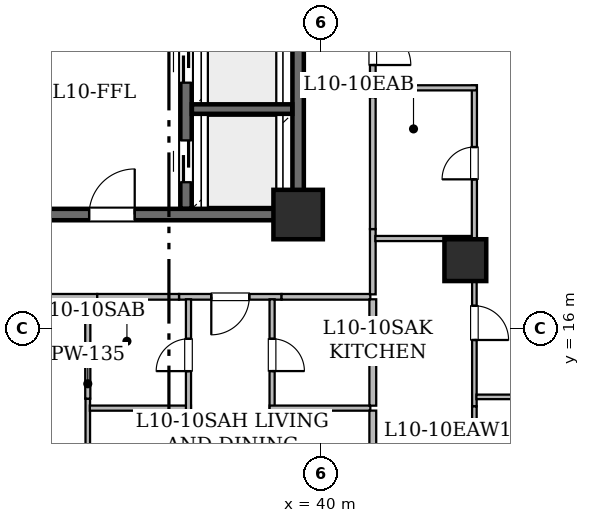
"""IFC4 building model, lengths in metres.
Left out: names, types, materials, properties, quantities, classifications, styles, units other than length and angle.
Written with IfcOpenShell. Run it as: python <this file> out.ifc"""

import sys

from ifc_helpers import new_model, si_unit, direction, frame, frame_2d, origin, origin_2d, place, context, subcontext, project, spatial, rectangle, hollow_rectangle, extrude, element, fill, save


model = new_model("IFC4")
c1 = context("Model", 3, precision=1e-05, world=origin(), true_north=direction((0.0, 1.0)))
c2 = subcontext(c1, "Body", "Model", "MODEL_VIEW")
j1 = project(units=[si_unit("LENGTHUNIT", "METRE"), si_unit("PLANEANGLEUNIT", "RADIAN")], contexts=[c1])
p1 = place(None, origin())
s1 = spatial("IfcSite", under=j1, at=p1, CompositionType="ELEMENT")
p2 = place(p1, origin())
s2 = spatial("IfcBuilding", under=s1, at=p2, CompositionType="ELEMENT")
p3 = place(p2, frame((0.0, 0.0, 44.25)))
s3 = spatial("IfcBuildingStorey", under=s2, at=p3, CompositionType="ELEMENT", Elevation=44.25)
p4 = place(p3, frame((39.4, 19.0, 0.0), z_axis=(0.0, 0.0, 1.0), x_axis=(1.0, 0.0, 0.0)))
e1 = element("IfcColumn", 1, at=p4, inside=s3, PredefinedType="COLUMN", context=c2, shape_type="SweptSolid", body=[
    extrude(hollow_rectangle(XDim=1.3, YDim=1.3, WallThickness=0.065, at=origin_2d()), origin(), (0.0, 0.0, 1.0), 3.65),
])
p5 = place(p3, frame((43.8, 17.8, 0.0), z_axis=(0.0, 0.0, 1.0), x_axis=(1.0, 0.0, 0.0)))
e2 = element("IfcColumn", 2, at=p5, inside=s3, PredefinedType="COLUMN", context=c2, shape_type="SweptSolid", body=[
    extrude(hollow_rectangle(XDim=1.1, YDim=1.1, WallThickness=0.055, at=origin_2d()), origin(), (0.0, 0.0, 1.0), 3.65),
])
p6 = place(p3, frame((29.0, 19.0, 0.0), z_axis=(0.0, 0.0, 1.0), x_axis=(1.0, 0.0, 0.0)))
e3 = element("IfcWall", 3, at=p6, inside=s3, PredefinedType="SHEAR", context=c2, shape_type="SweptSolid", body=[
    extrude(rectangle(XDim=10.4, YDim=0.3, at=frame_2d((5.2, 0.0))), origin(), (0.0, 0.0, 1.0), 3.43),
])
p7 = place(p6, frame((4.9, 0.0, 0.0)))
e4 = element("IfcOpeningElement", 4, at=p7, cuts=e3, PredefinedType="OPENING", context=c2, shape_type="SweptSolid", body=[
    extrude(rectangle(XDim=1.2, YDim=2.15, at=frame_2d((0.6, 1.075))), frame((0.0, 0.16, 0.0), z_axis=(0.0, -1.0, 0.0), x_axis=(1.0, 0.0, 0.0)), (0.0, 0.0, 1.0), 0.32),
])
p8 = place(p3, frame((39.4, 19.0, 0.0), z_axis=(0.0, 0.0, 1.0), x_axis=(0.0, 1.0, 0.0)))
e5 = element("IfcWall", 5, at=p8, inside=s3, PredefinedType="SHEAR", context=c2, shape_type="SweptSolid", body=[
    extrude(rectangle(XDim=5.4, YDim=0.3, at=frame_2d((2.7, 0.0))), origin(), (0.0, 0.0, 1.0), 3.43),
])
p9 = place(p3, frame((36.45, 19.154, 0.0), z_axis=(0.0, 0.0, 1.0), x_axis=(0.0, 1.0, 0.0)))
e6 = element("IfcWall", 6, at=p9, inside=s3, PredefinedType="SHEAR", context=c2, shape_type="SweptSolid", body=[
    extrude(rectangle(XDim=4.596, YDim=0.3, at=frame_2d((2.298, 0.0))), origin(), (0.0, 0.0, 1.0), 3.43),
])
p10 = place(p9, frame((0.696, 0.0, 0.0)))
e7 = element("IfcOpeningElement", 7, at=p10, cuts=e6, PredefinedType="OPENING", context=c2, shape_type="SweptSolid", body=[
    extrude(rectangle(XDim=1.1, YDim=2.15, at=frame_2d((0.55, 1.075))), frame((0.0, 0.16, 0.0), z_axis=(0.0, -1.0, 0.0), x_axis=(1.0, 0.0, 0.0)), (0.0, 0.0, 1.0), 0.32),
])
p11 = place(p9, frame((3.316, 0.0, 0.0)))
e8 = element("IfcOpeningElement", 8, at=p11, cuts=e6, PredefinedType="OPENING", context=c2, shape_type="SweptSolid", body=[
    extrude(rectangle(XDim=1.1, YDim=2.15, at=frame_2d((0.55, 1.075))), frame((0.0, 0.16, 0.0), z_axis=(0.0, -1.0, 0.0), x_axis=(1.0, 0.0, 0.0)), (0.0, 0.0, 1.0), 0.32),
])
p12 = place(p3, frame((36.604, 21.775, 0.0), z_axis=(0.0, 0.0, 1.0), x_axis=(1.0, 0.0, 0.0)))
e9 = element("IfcWall", 9, at=p12, inside=s3, PredefinedType="SHEAR", context=c2, shape_type="SweptSolid", body=[
    extrude(rectangle(XDim=2.642, YDim=0.25, at=frame_2d((1.321, 0.0))), origin(), (0.0, 0.0, 1.0), 3.43),
])
p13 = place(p3, frame((34.114, 16.835, 0.0), z_axis=(0.0, 0.0, 1.0), x_axis=(-1.0, 0.0, 0.0)))
e10 = element("IfcWall", 10, at=p13, inside=s3, PredefinedType="STANDARD", context=c2, shape_type="SweptSolid", body=[
    extrude(rectangle(XDim=7.214, YDim=0.15, at=frame_2d((3.607, 0.0))), origin(), (0.0, 0.0, 1.0), 2.647),
])
p14 = place(p13, frame((3.053, 0.0, 0.0)))
e11 = element("IfcOpeningElement", 11, at=p14, cuts=e10, PredefinedType="OPENING", context=c2, shape_type="SweptSolid", body=[
    extrude(rectangle(XDim=1.15, YDim=2.2, at=frame_2d((0.575, 1.1))), frame((0.0, 0.085, 0.0), z_axis=(0.0, -1.0, 0.0), x_axis=(1.0, 0.0, 0.0)), (0.0, 0.0, 1.0), 0.17),
])
p15 = place(p3, frame((38.964, 16.835, 0.0), z_axis=(0.0, 0.0, 1.0), x_axis=(-1.0, 0.0, 0.0)))
e12 = element("IfcWall", 12, at=p15, inside=s3, PredefinedType="STANDARD", context=c2, shape_type="SweptSolid", body=[
    extrude(rectangle(XDim=2.698, YDim=0.15, at=frame_2d((1.349, 0.0))), origin(), (0.0, 0.0, 1.0), 3.43),
])
p16 = place(p15, frame((0.849, 0.0, 0.0)))
e13 = element("IfcOpeningElement", 13, at=p16, cuts=e12, PredefinedType="OPENING", context=c2, shape_type="SweptSolid", body=[
    extrude(rectangle(XDim=1.0, YDim=2.15, at=frame_2d((0.5, 1.075))), frame((0.0, 0.085, 0.0), z_axis=(0.0, -1.0, 0.0), x_axis=(1.0, 0.0, 0.0)), (0.0, 0.0, 1.0), 0.17),
])
p17 = place(p3, frame((36.266, 16.835, 0.0), z_axis=(0.0, 0.0, 1.0), x_axis=(-1.0, 0.0, 0.0)))
e14 = element("IfcWall", 14, at=p17, inside=s3, PredefinedType="STANDARD", context=c2, shape_type="SweptSolid", body=[
    extrude(rectangle(XDim=2.152, YDim=0.15, at=frame_2d((1.076, 0.0))), origin(), (0.0, 0.0, 1.0), 3.43),
])
p18 = place(p3, frame((41.3, 16.835, 0.0), z_axis=(0.0, 0.0, 1.0), x_axis=(-1.0, 0.0, 0.0)))
e15 = element("IfcWall", 15, at=p18, inside=s3, PredefinedType="STANDARD", context=c2, shape_type="SweptSolid", body=[
    extrude(rectangle(XDim=2.336, YDim=0.15, at=frame_2d((1.168, 0.0))), origin(), (0.0, 0.0, 1.0), 3.43),
])
p19 = place(p3, frame((41.365, 18.618, 0.0), z_axis=(0.0, 0.0, 1.0), x_axis=(0.0, -1.0, 0.0)))
e16 = element("IfcWall", 16, at=p19, inside=s3, PredefinedType="STANDARD", context=c2, shape_type="SweptSolid", body=[
    extrude(rectangle(XDim=1.718, YDim=0.15, at=frame_2d((0.859, 0.0))), origin(), (0.0, 0.0, 1.0), 2.647),
])
p20 = place(p3, frame((41.365, 24.783, 0.0), z_axis=(0.0, 0.0, 1.0), x_axis=(0.0, -1.0, 0.0)))
e17 = element("IfcWall", 17, at=p20, inside=s3, PredefinedType="STANDARD", context=c2, shape_type="SweptSolid", body=[
    extrude(rectangle(XDim=2.698, YDim=0.15, at=frame_2d((1.349, 0.0))), origin(), (0.0, 0.0, 1.0), 2.957),
])
p21 = place(p20, frame((0.849, 0.0, 0.0)))
e18 = element("IfcOpeningElement", 18, at=p21, cuts=e17, PredefinedType="OPENING", context=c2, shape_type="SweptSolid", body=[
    extrude(rectangle(XDim=1.0, YDim=2.15, at=frame_2d((0.5, 1.075))), frame((0.0, 0.085, 0.0), z_axis=(0.0, -1.0, 0.0), x_axis=(1.0, 0.0, 0.0)), (0.0, 0.0, 1.0), 0.17),
])
p22 = place(p3, frame((41.365, 22.085, 0.0), z_axis=(0.0, 0.0, 1.0), x_axis=(0.0, -1.0, 0.0)))
e19 = element("IfcWall", 19, at=p22, inside=s3, PredefinedType="STANDARD", context=c2, shape_type="SweptSolid", body=[
    extrude(rectangle(XDim=3.467, YDim=0.15, at=frame_2d((1.733, 0.0))), origin(), (0.0, 0.0, 1.0), 2.647),
])
p23 = place(p3, frame((33.865, 14.155, 0.0), z_axis=(0.0, 0.0, 1.0), x_axis=(0.0, -1.0, 0.0)))
e20 = element("IfcWall", 20, at=p23, inside=s3, PredefinedType="PARTITIONING", context=c2, shape_type="SweptSolid", body=[
    extrude(rectangle(XDim=10.943, YDim=0.12, at=frame_2d((5.472, 0.0))), origin(), (0.0, 0.0, 1.0), 2.803),
])
p24 = place(p3, frame((33.865, 16.77, 0.0), z_axis=(0.0, 0.0, 1.0), x_axis=(0.0, -1.0, 0.0)))
e21 = element("IfcWall", 21, at=p24, inside=s3, PredefinedType="PARTITIONING", context=c2, shape_type="SweptSolid", body=[
    extrude(rectangle(XDim=2.615, YDim=0.135, at=frame_2d((1.308, 0.0))), origin(), (0.0, 0.0, 1.0), 3.43),
])
p25 = place(p3, frame((33.919, 13.906, 0.0), z_axis=(0.0, 0.0, 1.0), x_axis=(1.0, 0.0, 0.0)))
e22 = element("IfcWall", 22, at=p25, inside=s3, PredefinedType="PARTITIONING", context=c2, shape_type="SweptSolid", body=[
    extrude(rectangle(XDim=2.661, YDim=0.135, at=frame_2d((1.331, 0.0))), origin(), (0.0, 0.0, 1.0), 3.43),
])
p26 = place(p3, frame((36.515, 13.841, 0.0), z_axis=(0.0, 0.0, 1.0), x_axis=(0.0, 1.0, 0.0)))
e23 = element("IfcWall", 23, at=p26, inside=s3, PredefinedType="PARTITIONING", context=c2, shape_type="SweptSolid", body=[
    extrude(rectangle(XDim=2.929, YDim=0.135, at=frame_2d((1.464, 0.0))), origin(), (0.0, 0.0, 1.0), 3.43),
])
p27 = place(p26, frame((1.039, 0.0, 0.0)))
e24 = element("IfcOpeningElement", 24, at=p27, cuts=e23, PredefinedType="OPENING", context=c2, shape_type="SweptSolid", body=[
    extrude(rectangle(XDim=0.85, YDim=2.1, at=frame_2d((0.425, 1.05))), frame((0.0, 0.077, 0.0), z_axis=(0.0, -1.0, 0.0), x_axis=(1.0, 0.0, 0.0)), (0.0, 0.0, 1.0), 0.155),
])
p28 = place(p3, frame((38.715, 16.77, 0.0), z_axis=(0.0, 0.0, 1.0), x_axis=(0.0, -1.0, 0.0)))
e25 = element("IfcWall", 25, at=p28, inside=s3, PredefinedType="PARTITIONING", context=c2, shape_type="SweptSolid", body=[
    extrude(rectangle(XDim=2.929, YDim=0.135, at=frame_2d((1.464, 0.0))), origin(), (0.0, 0.0, 1.0), 3.43),
])
p29 = place(p28, frame((1.039, 0.0, 0.0)))
e26 = element("IfcOpeningElement", 26, at=p29, cuts=e25, PredefinedType="OPENING", context=c2, shape_type="SweptSolid", body=[
    extrude(rectangle(XDim=0.85, YDim=2.1, at=frame_2d((0.425, 1.05))), frame((0.0, 0.077, 0.0), z_axis=(0.0, -1.0, 0.0), x_axis=(1.0, 0.0, 0.0)), (0.0, 0.0, 1.0), 0.155),
])
p30 = place(p3, frame((38.65, 13.906, 0.0), z_axis=(0.0, 0.0, 1.0), x_axis=(1.0, 0.0, 0.0)))
e27 = element("IfcWall", 27, at=p30, inside=s3, PredefinedType="PARTITIONING", context=c2, shape_type="SweptSolid", body=[
    extrude(rectangle(XDim=2.65, YDim=0.135, at=frame_2d((1.325, 0.0))), origin(), (0.0, 0.0, 1.0), 3.43),
])
p31 = place(p3, frame((41.365, 13.841, 0.0), z_axis=(0.0, 0.0, 1.0), x_axis=(0.0, -1.0, 0.0)))
e28 = element("IfcWall", 28, at=p31, inside=s3, PredefinedType="STANDARD", context=c2, shape_type="SweptSolid", body=[
    extrude(rectangle(XDim=1.45, YDim=0.18, at=frame_2d((0.725, 0.0))), origin(), (0.0, 0.0, 1.0), 3.43),
])
p32 = place(p3, frame((41.365, 16.77, 0.0), z_axis=(0.0, 0.0, 1.0), x_axis=(0.0, -1.0, 0.0)))
e29 = element("IfcWall", 29, at=p32, inside=s3, PredefinedType="STANDARD", context=c2, shape_type="SweptSolid", body=[
    extrude(rectangle(XDim=2.799, YDim=0.18, at=frame_2d((1.399, 0.0))), origin(), (0.0, 0.0, 1.0), 3.43),
])
p33 = place(p3, frame((44.038, 18.304, 0.0), z_axis=(0.0, 0.0, 1.0), x_axis=(0.0, -1.0, 0.0)))
e30 = element("IfcWall", 30, at=p33, inside=s3, PredefinedType="PARTITIONING", context=c2, shape_type="SweptSolid", body=[
    extrude(rectangle(XDim=4.351, YDim=0.12, at=frame_2d((2.176, 0.0))), origin(), (0.0, 0.0, 1.0), 2.647),
])
p34 = place(p33, frame((1.705, 0.0, 0.0)))
e31 = element("IfcOpeningElement", 31, at=p34, cuts=e30, PredefinedType="OPENING", context=c2, shape_type="SweptSolid", body=[
    extrude(rectangle(XDim=0.9, YDim=2.1, at=frame_2d((0.45, 1.05))), frame((0.0, 0.07, 0.0), z_axis=(0.0, -1.0, 0.0), x_axis=(1.0, 0.0, 0.0)), (0.0, 0.0, 1.0), 0.14),
])
p35 = place(p3, frame((44.038, 13.953, 0.0), z_axis=(0.0, 0.0, 1.0), x_axis=(0.0, -1.0, 0.0)))
e32 = element("IfcWall", 32, at=p35, inside=s3, PredefinedType="PARTITIONING", context=c2, shape_type="SweptSolid", body=[
    extrude(rectangle(XDim=10.741, YDim=0.12, at=frame_2d((5.371, 0.0))), origin(), (0.0, 0.0, 1.0), 2.647),
])
p36 = place(p35, frame((4.92, 0.0, 0.0)))
e33 = element("IfcOpeningElement", 33, at=p36, cuts=e32, PredefinedType="OPENING", context=c2, shape_type="SweptSolid", body=[
    extrude(rectangle(XDim=0.9, YDim=2.1, at=frame_2d((0.45, 1.05))), frame((0.0, 0.07, 0.0), z_axis=(0.0, -1.0, 0.0), x_axis=(1.0, 0.0, 0.0)), (0.0, 0.0, 1.0), 0.14),
])
p37 = place(p3, frame((41.432, 18.369, 0.0), z_axis=(0.0, 0.0, 1.0), x_axis=(1.0, 0.0, 0.0)))
e34 = element("IfcWall", 34, at=p37, inside=s3, PredefinedType="PARTITIONING", context=c2, shape_type="SweptSolid", body=[
    extrude(rectangle(XDim=2.541, YDim=0.135, at=frame_2d((1.271, 0.0))), origin(), (0.0, 0.0, 1.0), 2.647),
])
p38 = place(p3, frame((47.453, 14.202, 0.0), z_axis=(0.0, 0.0, 1.0), x_axis=(-1.0, 0.0, 0.0)))
e35 = element("IfcWall", 35, at=p38, inside=s3, PredefinedType="PARTITIONING", context=c2, shape_type="SweptSolid", body=[
    extrude(rectangle(XDim=3.361, YDim=0.12, at=frame_2d((1.68, 0.0))), origin(), (0.0, 0.0, 1.0), 2.647),
])
p39 = place(p38, frame((1.231, 0.0, 0.0)))
e36 = element("IfcOpeningElement", 36, at=p39, cuts=e35, PredefinedType="OPENING", context=c2, shape_type="SweptSolid", body=[
    extrude(rectangle(XDim=0.9, YDim=2.1, at=frame_2d((0.45, 1.05))), frame((0.0, 0.07, 0.0), z_axis=(0.0, -1.0, 0.0), x_axis=(1.0, 0.0, 0.0)), (0.0, 0.0, 1.0), 0.14),
])
p40 = place(p3, frame((44.038, 18.304, 0.0), z_axis=(0.0, 0.0, 1.0), x_axis=(0.0, 1.0, 0.0)))
e37 = element("IfcWall", 37, at=p40, inside=s3, PredefinedType="PARTITIONING", context=c2, shape_type="SweptSolid", body=[
    extrude(rectangle(XDim=4.095, YDim=0.135, at=frame_2d((2.047, 0.0))), origin(), (0.0, 0.0, 1.0), 2.647),
])
p41 = place(p40, frame((1.622, 0.0, 0.0)))
e38 = element("IfcOpeningElement", 38, at=p41, cuts=e37, PredefinedType="OPENING", context=c2, shape_type="SweptSolid", body=[
    extrude(rectangle(XDim=0.85, YDim=2.1, at=frame_2d((0.425, 1.05))), frame((0.0, 0.077, 0.0), z_axis=(0.0, -1.0, 0.0), x_axis=(1.0, 0.0, 0.0)), (0.0, 0.0, 1.0), 0.155),
])
p42 = place(p3, frame((44.103, 22.334, 0.0), z_axis=(0.0, 0.0, 1.0), x_axis=(-1.0, 0.0, 0.0)))
e39 = element("IfcWall", 39, at=p42, inside=s3, PredefinedType="PARTITIONING", context=c2, shape_type="SweptSolid", body=[
    extrude(rectangle(XDim=2.671, YDim=0.135, at=frame_2d((1.335, 0.0))), origin(), (0.0, 0.0, 1.0), 2.647),
])
p43 = place(p7, origin())
e40 = element("IfcDoor", 40, at=p43, inside=s3, OperationType="SINGLE_SWING_RIGHT", PredefinedType="DOOR", context=c2, shape_type="SweptSolid", body=[
    extrude(rectangle(XDim=1.2, YDim=2.15, at=frame_2d((0.6, 1.075))), frame((0.0, 0.025, 0.0), z_axis=(0.0, -1.0, 0.0), x_axis=(1.0, 0.0, 0.0)), (0.0, 0.0, 1.0), 0.05),
])
fill(e4, e40)
p44 = place(p10, origin())
e41 = element("IfcDoor", 41, at=p44, inside=s3, OperationType="SLIDING_TO_LEFT", PredefinedType="DOOR", context=c2, shape_type="SweptSolid", body=[
    extrude(rectangle(XDim=1.1, YDim=2.15, at=frame_2d((0.55, 1.075))), frame((0.0, 0.025, 0.0), z_axis=(0.0, -1.0, 0.0), x_axis=(1.0, 0.0, 0.0)), (0.0, 0.0, 1.0), 0.05),
])
fill(e7, e41)
p45 = place(p11, origin())
e42 = element("IfcDoor", 42, at=p45, inside=s3, OperationType="SLIDING_TO_LEFT", PredefinedType="DOOR", context=c2, shape_type="SweptSolid", body=[
    extrude(rectangle(XDim=1.1, YDim=2.15, at=frame_2d((0.55, 1.075))), frame((0.0, 0.025, 0.0), z_axis=(0.0, -1.0, 0.0), x_axis=(1.0, 0.0, 0.0)), (0.0, 0.0, 1.0), 0.05),
])
fill(e8, e42)
p46 = place(p16, origin())
e43 = element("IfcDoor", 43, at=p46, inside=s3, OperationType="SINGLE_SWING_RIGHT", PredefinedType="DOOR", context=c2, shape_type="SweptSolid", body=[
    extrude(rectangle(XDim=1.0, YDim=2.15, at=frame_2d((0.5, 1.075))), frame((0.0, 0.025, 0.0), z_axis=(0.0, -1.0, 0.0), x_axis=(1.0, 0.0, 0.0)), (0.0, 0.0, 1.0), 0.05),
])
fill(e13, e43)
p47 = place(p21, origin())
e44 = element("IfcDoor", 44, at=p47, inside=s3, OperationType="SINGLE_SWING_RIGHT", PredefinedType="DOOR", context=c2, shape_type="SweptSolid", body=[
    extrude(rectangle(XDim=1.0, YDim=2.15, at=frame_2d((0.5, 1.075))), frame((0.0, 0.025, 0.0), z_axis=(0.0, -1.0, 0.0), x_axis=(1.0, 0.0, 0.0)), (0.0, 0.0, 1.0), 0.05),
])
fill(e18, e44)
p48 = place(p27, origin())
e45 = element("IfcDoor", 45, at=p48, inside=s3, OperationType="SINGLE_SWING_LEFT", PredefinedType="DOOR", context=c2, shape_type="SweptSolid", body=[
    extrude(rectangle(XDim=0.85, YDim=2.1, at=frame_2d((0.425, 1.05))), frame((0.0, 0.025, 0.0), z_axis=(0.0, -1.0, 0.0), x_axis=(1.0, 0.0, 0.0)), (0.0, 0.0, 1.0), 0.05),
])
fill(e24, e45)
p49 = place(p29, origin())
e46 = element("IfcDoor", 46, at=p49, inside=s3, OperationType="SINGLE_SWING_RIGHT", PredefinedType="DOOR", context=c2, shape_type="SweptSolid", body=[
    extrude(rectangle(XDim=0.85, YDim=2.1, at=frame_2d((0.425, 1.05))), frame((0.0, 0.025, 0.0), z_axis=(0.0, -1.0, 0.0), x_axis=(1.0, 0.0, 0.0)), (0.0, 0.0, 1.0), 0.05),
])
fill(e26, e46)
p50 = place(p34, origin())
e47 = element("IfcDoor", 47, at=p50, inside=s3, OperationType="SINGLE_SWING_RIGHT", PredefinedType="DOOR", context=c2, shape_type="SweptSolid", body=[
    extrude(rectangle(XDim=0.9, YDim=2.1, at=frame_2d((0.45, 1.05))), frame((0.0, 0.025, 0.0), z_axis=(0.0, -1.0, 0.0), x_axis=(1.0, 0.0, 0.0)), (0.0, 0.0, 1.0), 0.05),
])
fill(e31, e47)
p51 = place(p41, origin())
e48 = element("IfcDoor", 48, at=p51, inside=s3, OperationType="SINGLE_SWING_LEFT", PredefinedType="DOOR", context=c2, shape_type="SweptSolid", body=[
    extrude(rectangle(XDim=0.85, YDim=2.1, at=frame_2d((0.425, 1.05))), frame((0.0, 0.025, 0.0), z_axis=(0.0, -1.0, 0.0), x_axis=(1.0, 0.0, 0.0)), (0.0, 0.0, 1.0), 0.05),
])
fill(e38, e48)
save(model, sys.argv[1])
